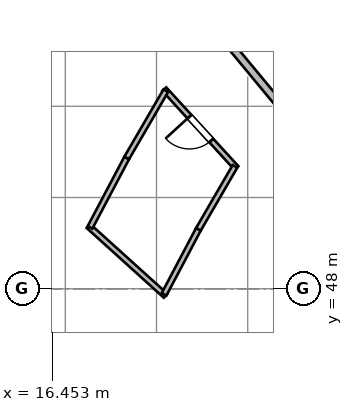
"""IFC4 building model, lengths in metres.
Left out: names, types, materials, properties, quantities, classifications, styles, units other than length and angle.
Written with IfcOpenShell. Run it as: python <this file> out.ifc"""

import sys

from ifc_helpers import new_model, si_unit, direction, frame, frame_2d, origin, place, context, subcontext, project, spatial, rectangle, extrude, source, transform, mapped, element, fill, save


model = new_model("IFC4")
c1 = context("Model", 3, precision=1e-05, world=origin(), true_north=direction((0.0, 1.0)))
c2 = subcontext(c1, "Body", "Model", "MODEL_VIEW")
j1 = project(units=[si_unit("LENGTHUNIT", "METRE"), si_unit("PLANEANGLEUNIT", "RADIAN")], contexts=[c1])
p1 = place(None, origin())
s1 = spatial("IfcSite", under=j1, at=p1, CompositionType="ELEMENT")
p2 = place(p1, origin())
s2 = spatial("IfcBuilding", under=s1, at=p2, CompositionType="ELEMENT")
p3 = place(p2, frame((0.0, 0.0, 42.6)))
s3 = spatial("IfcBuildingStorey", under=s2, at=p3, CompositionType="ELEMENT", Elevation=42.6)
m1 = source(origin(), c2, "Body", "SweptSolid", [
    extrude(rectangle(XDim=10.975, YDim=0.195, at=frame_2d((5.487, 0.0))), origin(), (0.0, 0.0, 1.0), 3.36),
])
p4 = place(p3, frame((22.54, 52.719, 0.0), z_axis=(0.0, 0.0, 1.0), x_axis=(-0.638125265812, 0.769932558821, 0.0)))
e1 = element("IfcWall", 1, at=p4, inside=s3, PredefinedType="PARTITIONING", context=c2, shape_type="MappedRepresentation", body=[
    mapped(m1, transform((0.0, 0.0, 0.0), scale=1.0)),
])
m2 = source(origin(), c2, "Body", "SweptSolid", [
    extrude(rectangle(XDim=2.812, YDim=0.14, at=frame_2d((1.406, 0.0))), origin(), (0.0, 0.0, 1.0), 3.36),
])
p5 = place(p3, frame((21.303, 51.177, 0.0), z_axis=(0.0, 0.0, 1.0), x_axis=(-0.675119025852, 0.737708818527, 0.0)))
e2 = element("IfcWall", 2, at=p5, inside=s3, PredefinedType="PARTITIONING", context=c2, shape_type="MappedRepresentation", body=[
    mapped(m2, transform((0.0, 0.0, 0.0), scale=1.0)),
])
p6 = place(p5, frame((0.981, 0.0, 0.0)))
e3 = element("IfcOpeningElement", 3, at=p6, cuts=e2, PredefinedType="OPENING", context=c2, shape_type="SweptSolid", body=[
    extrude(rectangle(XDim=0.85, YDim=2.05, at=frame_2d((0.425, 1.025))), frame((0.0, 0.08, 0.0), z_axis=(0.0, -1.0, 0.0), x_axis=(1.0, 0.0, 0.0)), (0.0, 0.0, 1.0), 0.16),
])
m3 = source(origin(), c2, "Body", "SweptSolid", [
    extrude(rectangle(XDim=2.738, YDim=0.14, at=frame_2d((1.369, 0.0))), origin(), (0.0, 0.0, 1.0), 3.36),
])
p7 = place(p3, frame((19.44, 47.814, 0.0), z_axis=(0.0, 0.0, 1.0), x_axis=(-0.741873676582, 0.670539669218, 0.0)))
e4 = element("IfcWall", 4, at=p7, inside=s3, PredefinedType="PARTITIONING", context=c2, shape_type="MappedRepresentation", body=[
    mapped(m3, transform((0.0, 0.0, 0.0), scale=1.0)),
])
m4 = source(origin(), c2, "Body", "SweptSolid", [
    extrude(rectangle(XDim=1.936, YDim=0.14, at=frame_2d((0.968, 0.0))), origin(), (0.0, 0.0, 1.0), 3.36),
])
p8 = place(p3, frame((19.398, 47.852, 0.0), z_axis=(0.0, 0.0, 1.0), x_axis=(0.467174971862, 0.884164886017, 0.0)))
e5 = element("IfcWall", 5, at=p8, inside=s3, PredefinedType="PARTITIONING", context=c2, shape_type="MappedRepresentation", body=[
    mapped(m4, transform((0.0, 0.0, 0.0), scale=1.0)),
])
m5 = source(origin(), c2, "Body", "SweptSolid", [
    extrude(rectangle(XDim=2.068, YDim=0.14, at=frame_2d((1.034, 0.0))), origin(), (0.0, 0.0, 1.0), 3.36),
])
p9 = place(p3, frame((17.45, 49.612, 0.0), z_axis=(0.0, 0.0, 1.0), x_axis=(0.467215057643, 0.884143704333, 0.0)))
e6 = element("IfcWall", 6, at=p9, inside=s3, PredefinedType="PARTITIONING", context=c2, shape_type="MappedRepresentation", body=[
    mapped(m5, transform((0.0, 0.0, 0.0), scale=1.0)),
])
m6 = source(origin(), c2, "Body", "SweptSolid", [
    extrude(rectangle(XDim=1.914, YDim=0.14, at=frame_2d((0.957, 0.0))), origin(), (0.0, 0.0, 1.0), 3.36),
])
p10 = place(p3, frame((20.303, 49.563, 0.0), z_axis=(0.0, 0.0, 1.0), x_axis=(0.502347790612, 0.864665656347, 0.0)))
e7 = element("IfcWall", 7, at=p10, inside=s3, PredefinedType="PARTITIONING", context=c2, shape_type="MappedRepresentation", body=[
    mapped(m6, transform((0.0, 0.0, 0.0), scale=1.0)),
])
m7 = source(origin(), c2, "Body", "SweptSolid", [
    extrude(rectangle(XDim=2.045, YDim=0.14, at=frame_2d((1.022, 0.0))), origin(), (0.0, 0.0, 1.0), 3.36),
])
p11 = place(p3, frame((18.416, 51.441, 0.0), z_axis=(0.0, 0.0, 1.0), x_axis=(0.5023112139, 0.864686905411, 0.0)))
e8 = element("IfcWall", 8, at=p11, inside=s3, PredefinedType="PARTITIONING", context=c2, shape_type="MappedRepresentation", body=[
    mapped(m7, transform((0.0, 0.0, 0.0), scale=1.0)),
])
m8 = source(origin(), c2, "Body", "SweptSolid", [
    extrude(rectangle(XDim=0.85, YDim=2.05, at=frame_2d((0.425, 1.025))), frame((0.0, 0.025, 0.0), z_axis=(0.0, -1.0, 0.0), x_axis=(1.0, 0.0, 0.0)), (0.0, 0.0, 1.0), 0.05),
])
p12 = place(p6, origin())
e9 = element("IfcDoor", 9, at=p12, inside=s3, OperationType="SINGLE_SWING_RIGHT", PredefinedType="DOOR", context=c2, shape_type="MappedRepresentation", body=[
    mapped(m8, transform((0.0, 0.0, 0.0), scale=1.0)),
])
fill(e3, e9)
save(model, sys.argv[1])
